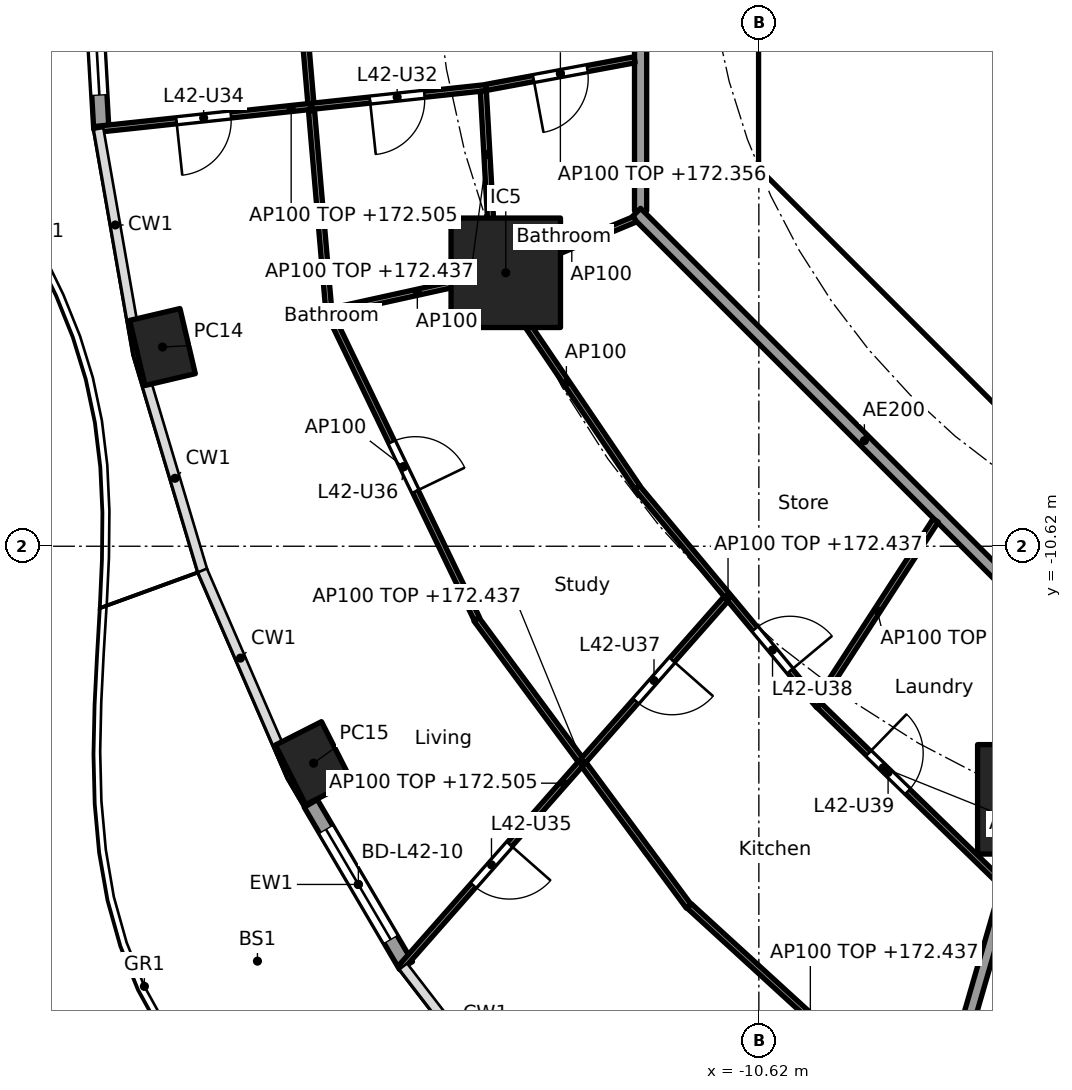
"""IFC4 building model, lengths in metres.
Left out: names, types, materials, properties, quantities, classifications, styles, units other than length and angle.
Written with IfcOpenShell. Run it as: python <this file> out.ifc"""

import sys

from ifc_helpers import new_model, si_unit, direction, frame, frame_2d, origin, origin_2d, place, context, subcontext, project, spatial, polyline, rectangle, hollow_rectangle, outline, extrude, element, fill, save


model = new_model("IFC4")
c1 = context("Model", 3, precision=1e-05, world=origin(), true_north=direction((0.0, 1.0)))
c2 = subcontext(c1, "Body", "Model", "MODEL_VIEW")
j1 = project(units=[si_unit("LENGTHUNIT", "METRE"), si_unit("PLANEANGLEUNIT", "RADIAN")], contexts=[c1])
p1 = place(None, origin())
s1 = spatial("IfcSite", under=j1, at=p1, CompositionType="ELEMENT")
p2 = place(p1, origin())
s2 = spatial("IfcBuilding", under=s1, at=p2, CompositionType="ELEMENT")
p3 = place(p2, frame((0.0, 0.0, 169.6)))
s3 = spatial("IfcBuildingStorey", under=s2, at=p3, CompositionType="ELEMENT", Elevation=169.6)
for number, where, z_axis, x_axis in (
    (1, (-20.427, -7.344, 0.0), (0.0, 0.0, 1.0), (0.229, -0.973, 0.0)),
    (2, (-17.942, -14.188, 0.0), (0.0, 0.0, 1.0), (0.452, -0.892, 0.0)),
):
    element("IfcColumn", number, at=place(p3, frame(where, z_axis=z_axis, x_axis=x_axis)), inside=s3, PredefinedType="COLUMN", context=c2, shape_type="SweptSolid", body=[
        extrude(hollow_rectangle(XDim=1.1, YDim=0.85, WallThickness=0.036, at=origin_2d()), origin(), (0.0, 0.0, 1.0), 3.7),
    ])
for number, where, z_axis, x_axis in (
    (3, (-14.782, -6.123, 0.0), (0.0, 0.0, 1.0), (1.0, 0.0, 0.0)),
    (4, (-6.123, -14.782, 0.0), (0.0, 0.0, 1.0), (1.0, 0.0, 0.0)),
):
    element("IfcColumn", number, at=place(p3, frame(where, z_axis=z_axis, x_axis=x_axis)), inside=s3, PredefinedType="COLUMN", context=c2, shape_type="SweptSolid", body=[
        extrude(rectangle(XDim=1.8, YDim=1.8, at=origin_2d()), origin(), (0.0, 0.0, 1.0), 3.7),
    ])
p4 = place(p3, frame((-21.433, -3.762, 0.0), z_axis=(0.0, 0.0, 1.0), x_axis=(-0.057532692854, 0.998343622834, 0.0)))
e5 = element("IfcWall", 5, at=p4, inside=s3, PredefinedType="SOLIDWALL", context=c2, shape_type="SweptSolid", body=[
    extrude(rectangle(XDim=3.225, YDim=0.25, at=frame_2d((1.613, 0.0))), origin(), (0.0, 0.0, 1.0), 3.44),
])
p5 = place(p4, frame((0.562, 0.0, 0.0)))
e6 = element("IfcOpeningElement", 6, at=p5, cuts=e5, PredefinedType="OPENING", context=c2, shape_type="SweptSolid", body=[
    extrude(rectangle(XDim=2.1, YDim=2.4, at=frame_2d((1.05, 1.2))), frame((0.0, 0.135, 0.0), z_axis=(0.0, -1.0, 0.0), x_axis=(1.0, 0.0, 0.0)), (0.0, 0.0, 1.0), 0.27),
])
p6 = place(p3, frame((-16.424, -17.515, 0.0), z_axis=(0.0, 0.0, 1.0), x_axis=(-0.506309086483, 0.862352079458, 0.0)))
e7 = element("IfcWall", 7, at=p6, inside=s3, PredefinedType="SOLIDWALL", context=c2, shape_type="SweptSolid", body=[
    extrude(rectangle(XDim=3.092, YDim=0.25, at=frame_2d((1.546, 0.0))), origin(), (0.0, 0.0, 1.0), 3.44),
])
p7 = place(p6, frame((0.496, 0.0, 0.0)))
e8 = element("IfcOpeningElement", 8, at=p7, cuts=e7, PredefinedType="OPENING", context=c2, shape_type="SweptSolid", body=[
    extrude(rectangle(XDim=2.1, YDim=2.4, at=frame_2d((1.05, 1.2))), frame((0.0, 0.135, 0.0), z_axis=(0.0, -1.0, 0.0), x_axis=(1.0, 0.0, 0.0)), (0.0, 0.0, 1.0), 0.27),
])
p8 = place(p3, frame((-10.325, 3.801, 0.0), z_axis=(0.0, 0.0, 1.0), x_axis=(0.0, -1.0, 0.0)))
e9 = element("IfcWall", 9, at=p8, inside=s3, PredefinedType="SHEAR", context=c2, shape_type="SweptSolid", body=[
    extrude(rectangle(XDim=7.602, YDim=0.6, at=frame_2d((3.801, 0.0))), origin(), (0.0, 0.0, 1.0), 3.44),
])
p9 = place(p8, frame((0.651, 0.0, 0.0)))
e10 = element("IfcOpeningElement", 10, at=p9, cuts=e9, PredefinedType="OPENING", context=c2, shape_type="SweptSolid", body=[
    extrude(rectangle(XDim=1.5, YDim=2.1, at=frame_2d((0.75, 1.05))), frame((0.0, 0.31, 0.0), z_axis=(0.0, -1.0, 0.0), x_axis=(1.0, 0.0, 0.0)), (0.0, 0.0, 1.0), 0.62),
])
p10 = place(p8, frame((5.451, 0.0, 0.0)))
e11 = element("IfcOpeningElement", 11, at=p10, cuts=e9, PredefinedType="OPENING", context=c2, shape_type="SweptSolid", body=[
    extrude(rectangle(XDim=1.5, YDim=2.1, at=frame_2d((0.75, 1.05))), frame((0.0, 0.31, 0.0), z_axis=(0.0, -1.0, 0.0), x_axis=(1.0, 0.0, 0.0)), (0.0, 0.0, 1.0), 0.62),
])
p11 = place(p3, frame((-9.988, -4.613, 0.0), z_axis=(0.0, 0.0, 1.0), x_axis=(0.707106781187, -0.707106781187, 0.0)))
e12 = element("IfcWall", 12, at=p11, inside=s3, PredefinedType="SHEAR", context=c2, shape_type="SweptSolid", body=[
    extrude(rectangle(XDim=7.602, YDim=0.6, at=frame_2d((3.801, 0.0))), origin(), (0.0, 0.0, 1.0), 3.44),
])
p12 = place(p11, frame((6.151, 0.0, 0.0)))
e13 = element("IfcOpeningElement", 13, at=p12, cuts=e12, PredefinedType="OPENING", context=c2, shape_type="SweptSolid", body=[
    extrude(rectangle(XDim=1.1, YDim=2.1, at=frame_2d((0.55, 1.05))), frame((0.0, 0.31, 0.0), z_axis=(0.0, -1.0, 0.0), x_axis=(1.0, 0.0, 0.0)), (0.0, 0.0, 1.0), 0.62),
])
p13 = place(p3, origin())
e14 = element("IfcWall", 14, at=p13, inside=s3, PredefinedType="SHEAR", context=c2, shape_type="SweptSolid", body=[
    extrude(outline(polyline([(-10.625, -3.801), (-10.025, -3.801), (-10.025, -4.152), (-9.776, -4.401), (-10.2, -4.825), (-10.625, -4.401), (-10.625, -3.801)])), origin(), (0.0, 0.0, 1.0), 3.44),
])
p14 = place(p3, frame((-10.025, -4.0, 0.0), z_axis=(0.0, 0.0, 1.0), x_axis=(1.0, 0.0, 0.0)))
e15 = element("IfcWall", 15, at=p14, inside=s3, PredefinedType="PARTITIONING", context=c2, shape_type="SweptSolid", body=[
    extrude(rectangle(XDim=3.325, YDim=0.2, at=frame_2d((1.662, 0.0))), origin(), (0.0, 0.0, 1.0), 3.44),
])
p15 = place(p3, frame((-8.301, -5.8, 0.0), z_axis=(0.0, 0.0, 1.0), x_axis=(1.0, 0.0, 0.0)))
e16 = element("IfcWall", 16, at=p15, inside=s3, PredefinedType="PARTITIONING", context=c2, shape_type="SweptSolid", body=[
    extrude(rectangle(XDim=2.426, YDim=0.15, at=frame_2d((1.213, 0.0))), origin(), (0.0, 0.0, 1.0), 3.44),
])
p16 = place(p3, frame((-6.137, -14.83, 0.0), z_axis=(0.0, 0.0, 1.0), x_axis=(-0.278461169897, -0.96044748782, 0.0)))
e17 = element("IfcWall", 17, at=p16, inside=s3, PredefinedType="PARTITIONING", context=c2, shape_type="SweptSolid", body=[
    extrude(rectangle(XDim=9.573, YDim=0.2, at=frame_2d((4.787, 0.0))), origin(), (0.0, 0.0, 1.0), 2.837),
])
p17 = place(p3, frame((-12.565, 5.304, 0.0), z_axis=(0.0, 0.0, 1.0), x_axis=(0.0, -1.0, 0.0)))
e18 = element("IfcWall", 18, at=p17, inside=s3, PredefinedType="PARTITIONING", context=c2, shape_type="SweptSolid", body=[
    extrude(rectangle(XDim=10.409, YDim=0.2, at=frame_2d((5.205, 0.0))), origin(), (0.0, 0.0, 1.0), 3.44),
])
p18 = place(p17, frame((6.106, 0.0, 0.0)))
e19 = element("IfcOpeningElement", 19, at=p18, cuts=e18, PredefinedType="OPENING", context=c2, shape_type="SweptSolid", body=[
    extrude(rectangle(XDim=1.0, YDim=2.1, at=frame_2d((0.5, 1.05))), frame((0.0, 0.11, 0.0), z_axis=(0.0, -1.0, 0.0), x_axis=(1.0, 0.0, 0.0)), (0.0, 0.0, 1.0), 0.22),
])
p19 = place(p3, frame((-12.635, -5.134, 0.0), z_axis=(0.0, 0.0, 1.0), x_axis=(0.707106781187, -0.707106781187, 0.0)))
e20 = element("IfcWall", 20, at=p19, inside=s3, PredefinedType="PARTITIONING", context=c2, shape_type="SweptSolid", body=[
    extrude(rectangle(XDim=10.609, YDim=0.2, at=frame_2d((5.305, 0.0))), origin(), (0.0, 0.0, 1.0), 3.44),
])
p20 = place(p3, frame((-18.271, -0.05, 0.0), z_axis=(0.0, 0.0, 1.0), x_axis=(0.086018199227, -0.996293565874, 0.0)))
e21 = element("IfcWall", 21, at=p20, inside=s3, PredefinedType="PARTITIONING", context=c2, shape_type="SweptSolid", body=[
    extrude(rectangle(XDim=6.789, YDim=0.1, at=frame_2d((3.395, 0.0))), origin(), (0.0, 0.0, 1.0), 2.837),
])
p21 = place(p3, frame((-12.663, -2.621, 0.0), z_axis=(0.0, 0.0, 1.0), x_axis=(-0.983176884312, -0.182655999505, 0.0)))
e22 = element("IfcWall", 22, at=p21, inside=s3, PredefinedType="PARTITIONING", context=c2, shape_type="SweptSolid", body=[
    extrude(rectangle(XDim=2.483, YDim=0.1, at=frame_2d((1.242, 0.0))), origin(), (0.0, 0.0, 1.0), 2.756),
])
p22 = place(p21, frame((0.792, 0.0, 0.0)))
e23 = element("IfcOpeningElement", 23, at=p22, cuts=e22, PredefinedType="OPENING", context=c2, shape_type="SweptSolid", body=[
    extrude(rectangle(XDim=0.9, YDim=2.1, at=frame_2d((0.45, 1.05))), frame((0.0, 0.06, 0.0), z_axis=(0.0, -1.0, 0.0), x_axis=(1.0, 0.0, 0.0)), (0.0, 0.0, 1.0), 0.12),
])
p23 = place(p3, frame((-15.104, -3.078, 0.0), z_axis=(0.0, 0.0, 1.0), x_axis=(-0.994316167803, -0.106467640365, 0.0)))
e24 = element("IfcWall", 24, at=p23, inside=s3, PredefinedType="PARTITIONING", context=c2, shape_type="SweptSolid", body=[
    extrude(rectangle(XDim=6.45, YDim=0.1, at=frame_2d((3.225, 0.0))), origin(), (0.0, 0.0, 1.0), 2.905),
])
p24 = place(p23, frame((1.022, 0.0, 0.0)))
e25 = element("IfcOpeningElement", 25, at=p24, cuts=e24, PredefinedType="OPENING", context=c2, shape_type="SweptSolid", body=[
    extrude(rectangle(XDim=0.9, YDim=2.1, at=frame_2d((0.45, 1.05))), frame((0.0, 0.06, 0.0), z_axis=(0.0, -1.0, 0.0), x_axis=(1.0, 0.0, 0.0)), (0.0, 0.0, 1.0), 0.12),
])
p25 = place(p23, frame((4.223, 0.0, 0.0)))
e26 = element("IfcOpeningElement", 26, at=p25, cuts=e24, PredefinedType="OPENING", context=c2, shape_type="SweptSolid", body=[
    extrude(rectangle(XDim=0.9, YDim=2.1, at=frame_2d((0.45, 1.05))), frame((0.0, 0.06, 0.0), z_axis=(0.0, -1.0, 0.0), x_axis=(1.0, 0.0, 0.0)), (0.0, 0.0, 1.0), 0.12),
])
p26 = place(p3, frame((-15.151, -3.133, 0.0), z_axis=(0.0, 0.0, 1.0), x_axis=(0.05637501378, -0.998409664327, 0.0)))
e27 = element("IfcWall", 27, at=p26, inside=s3, PredefinedType="PARTITIONING", context=c2, shape_type="SweptSolid", body=[
    extrude(rectangle(XDim=2.988, YDim=0.1, at=frame_2d((1.494, 0.0))), origin(), (0.0, 0.0, 1.0), 2.837),
])
p27 = place(p3, frame((-12.657, -5.243, 0.0), z_axis=(0.0, 0.0, 1.0), x_axis=(-0.923848837015, -0.382757529444, 0.0)))
e28 = element("IfcWall", 28, at=p27, inside=s3, PredefinedType="PARTITIONING", context=c2, shape_type="SweptSolid", body=[
    extrude(rectangle(XDim=2.25, YDim=0.1, at=frame_2d((1.125, 0.0))), origin(), (0.0, 0.0, 1.0), 3.44),
])
p28 = place(p3, frame((-14.831, -6.134, 0.0), z_axis=(0.0, 0.0, 1.0), x_axis=(-0.976560749847, -0.215241961191, 0.0)))
e29 = element("IfcWall", 29, at=p28, inside=s3, PredefinedType="PARTITIONING", context=c2, shape_type="SweptSolid", body=[
    extrude(rectangle(XDim=2.879, YDim=0.1, at=frame_2d((1.439, 0.0))), origin(), (0.0, 0.0, 1.0), 3.44),
])
p29 = place(p3, frame((-14.952, -6.208, 0.0), z_axis=(0.0, 0.0, 1.0), x_axis=(0.561064907171, -0.827771810308, 0.0)))
e30 = element("IfcWall", 30, at=p29, inside=s3, PredefinedType="PARTITIONING", context=c2, shape_type="SweptSolid", body=[
    extrude(rectangle(XDim=4.159, YDim=0.1, at=frame_2d((2.079, 0.0))), origin(), (0.0, 0.0, 1.0), 3.44),
])
p30 = place(p3, frame((-17.669, -6.809, 0.0), z_axis=(0.0, 0.0, 1.0), x_axis=(0.434040130629, -0.900893536997, 0.0)))
e31 = element("IfcWall", 31, at=p30, inside=s3, PredefinedType="PARTITIONING", context=c2, shape_type="SweptSolid", body=[
    extrude(rectangle(XDim=5.558, YDim=0.1, at=frame_2d((2.779, 0.0))), origin(), (0.0, 0.0, 1.0), 3.44),
])
p31 = place(p30, frame((2.329, 0.0, 0.0)))
e32 = element("IfcOpeningElement", 32, at=p31, cuts=e31, PredefinedType="OPENING", context=c2, shape_type="SweptSolid", body=[
    extrude(rectangle(XDim=0.9, YDim=2.1, at=frame_2d((0.45, 1.05))), frame((0.0, 0.06, 0.0), z_axis=(0.0, -1.0, 0.0), x_axis=(1.0, 0.0, 0.0)), (0.0, 0.0, 1.0), 0.12),
])
p32 = place(p3, frame((-12.623, -9.653, 0.0), z_axis=(0.0, 0.0, 1.0), x_axis=(0.640297481347, -0.768127030758, 0.0)))
e33 = element("IfcWall", 33, at=p32, inside=s3, PredefinedType="PARTITIONING", context=c2, shape_type="SweptSolid", body=[
    extrude(rectangle(XDim=4.672, YDim=0.1, at=frame_2d((2.336, 0.0))), origin(), (0.0, 0.0, 1.0), 2.837),
])
p33 = place(p32, frame((3.029, 0.0, 0.0)))
e34 = element("IfcOpeningElement", 34, at=p33, cuts=e33, PredefinedType="OPENING", context=c2, shape_type="SweptSolid", body=[
    extrude(rectangle(XDim=0.9, YDim=2.1, at=frame_2d((0.45, 1.05))), frame((0.0, 0.06, 0.0), z_axis=(0.0, -1.0, 0.0), x_axis=(1.0, 0.0, 0.0)), (0.0, 0.0, 1.0), 0.12),
])
p34 = place(p3, frame((-15.265, -11.821, 0.0), z_axis=(0.0, 0.0, 1.0), x_axis=(0.594711348772, -0.803939308432, 0.0)))
e35 = element("IfcWall", 35, at=p34, inside=s3, PredefinedType="PARTITIONING", context=c2, shape_type="SweptSolid", body=[
    extrude(rectangle(XDim=5.872, YDim=0.1, at=frame_2d((2.936, 0.0))), origin(), (0.0, 0.0, 1.0), 2.837),
])
p35 = place(p3, frame((-11.16, -11.485, 0.0), z_axis=(0.0, 0.0, 1.0), x_axis=(-0.661275898802, -0.750142776852, 0.0)))
e36 = element("IfcWall", 36, at=p35, inside=s3, PredefinedType="PARTITIONING", context=c2, shape_type="SweptSolid", body=[
    extrude(rectangle(XDim=8.083, YDim=0.1, at=frame_2d((4.041, 0.0))), origin(), (0.0, 0.0, 1.0), 2.905),
])
p36 = place(p35, frame((5.382, 0.0, 0.0)))
e37 = element("IfcOpeningElement", 37, at=p36, cuts=e36, PredefinedType="OPENING", context=c2, shape_type="SweptSolid", body=[
    extrude(rectangle(XDim=0.9, YDim=2.1, at=frame_2d((0.45, 1.05))), frame((0.0, 0.06, 0.0), z_axis=(0.0, -1.0, 0.0), x_axis=(1.0, 0.0, 0.0)), (0.0, 0.0, 1.0), 0.12),
])
p37 = place(p35, frame((1.341, 0.0, 0.0)))
e38 = element("IfcOpeningElement", 38, at=p37, cuts=e36, PredefinedType="OPENING", context=c2, shape_type="SweptSolid", body=[
    extrude(rectangle(XDim=0.9, YDim=2.1, at=frame_2d((0.45, 1.05))), frame((0.0, 0.06, 0.0), z_axis=(0.0, -1.0, 0.0), x_axis=(1.0, 0.0, 0.0)), (0.0, 0.0, 1.0), 0.12),
])
p38 = place(p3, frame((-7.712, -10.195, 0.0), z_axis=(0.0, 0.0, 1.0), x_axis=(-0.544170086001, -0.838974920663, 0.0)))
e39 = element("IfcWall", 39, at=p38, inside=s3, PredefinedType="PARTITIONING", context=c2, shape_type="SweptSolid", body=[
    extrude(rectangle(XDim=3.535, YDim=0.1, at=frame_2d((1.768, 0.0))), origin(), (0.0, 0.0, 1.0), 2.756),
])
p39 = place(p3, frame((-9.627, -13.238, 0.0), z_axis=(0.0, 0.0, 1.0), x_axis=(0.716919058692, -0.697156412352, 0.0)))
e40 = element("IfcWall", 40, at=p39, inside=s3, PredefinedType="PARTITIONING", context=c2, shape_type="SweptSolid", body=[
    extrude(rectangle(XDim=4.2, YDim=0.1, at=frame_2d((2.1, 0.0))), origin(), (0.0, 0.0, 1.0), 2.837),
])
p40 = place(p39, frame((1.13, 0.0, 0.0)))
e41 = element("IfcOpeningElement", 41, at=p40, cuts=e40, PredefinedType="OPENING", context=c2, shape_type="SweptSolid", body=[
    extrude(rectangle(XDim=0.9, YDim=2.1, at=frame_2d((0.45, 1.05))), frame((0.0, 0.06, 0.0), z_axis=(0.0, -1.0, 0.0), x_axis=(1.0, 0.0, 0.0)), (0.0, 0.0, 1.0), 0.12),
])
p41 = place(p3, frame((-11.766, -16.535, 0.0), z_axis=(0.0, 0.0, 1.0), x_axis=(0.73807320557, -0.674720640872, 0.0)))
e42 = element("IfcWall", 42, at=p41, inside=s3, PredefinedType="PARTITIONING", context=c2, shape_type="SweptSolid", body=[
    extrude(rectangle(XDim=5.399, YDim=0.1, at=frame_2d((2.699, 0.0))), origin(), (0.0, 0.0, 1.0), 2.837),
])
p42 = place(p5, origin())
e43 = element("IfcDoor", 43, at=p42, inside=s3, OperationType="SLIDING_TO_LEFT", PredefinedType="DOOR", context=c2, shape_type="SweptSolid", body=[
    extrude(rectangle(XDim=2.1, YDim=2.4, at=frame_2d((1.05, 1.2))), frame((0.0, 0.025, 0.0), z_axis=(0.0, -1.0, 0.0), x_axis=(1.0, 0.0, 0.0)), (0.0, 0.0, 1.0), 0.05),
])
fill(e6, e43)
p43 = place(p7, origin())
e44 = element("IfcDoor", 44, at=p43, inside=s3, OperationType="SLIDING_TO_LEFT", PredefinedType="DOOR", context=c2, shape_type="SweptSolid", body=[
    extrude(rectangle(XDim=2.1, YDim=2.4, at=frame_2d((1.05, 1.2))), frame((0.0, 0.025, 0.0), z_axis=(0.0, -1.0, 0.0), x_axis=(1.0, 0.0, 0.0)), (0.0, 0.0, 1.0), 0.05),
])
fill(e8, e44)
p44 = place(p10, origin())
e45 = element("IfcDoor", 45, at=p44, inside=s3, OperationType="DOUBLE_DOOR_SINGLE_SWING", PredefinedType="DOOR", context=c2, shape_type="SweptSolid", body=[
    extrude(rectangle(XDim=1.5, YDim=2.1, at=frame_2d((0.75, 1.05))), frame((0.0, 0.025, 0.0), z_axis=(0.0, -1.0, 0.0), x_axis=(1.0, 0.0, 0.0)), (0.0, 0.0, 1.0), 0.05),
])
fill(e11, e45)
p45 = place(p22, origin())
e46 = element("IfcDoor", 46, at=p45, inside=s3, OperationType="SINGLE_SWING_RIGHT", PredefinedType="DOOR", context=c2, shape_type="SweptSolid", body=[
    extrude(rectangle(XDim=0.9, YDim=2.1, at=frame_2d((0.45, 1.05))), frame((0.0, 0.025, 0.0), z_axis=(0.0, -1.0, 0.0), x_axis=(1.0, 0.0, 0.0)), (0.0, 0.0, 1.0), 0.05),
])
fill(e23, e46)
p46 = place(p24, origin())
e47 = element("IfcDoor", 47, at=p46, inside=s3, OperationType="SINGLE_SWING_RIGHT", PredefinedType="DOOR", context=c2, shape_type="SweptSolid", body=[
    extrude(rectangle(XDim=0.9, YDim=2.1, at=frame_2d((0.45, 1.05))), frame((0.0, 0.025, 0.0), z_axis=(0.0, -1.0, 0.0), x_axis=(1.0, 0.0, 0.0)), (0.0, 0.0, 1.0), 0.05),
])
fill(e25, e47)
p47 = place(p25, origin())
e48 = element("IfcDoor", 48, at=p47, inside=s3, OperationType="SINGLE_SWING_RIGHT", PredefinedType="DOOR", context=c2, shape_type="SweptSolid", body=[
    extrude(rectangle(XDim=0.9, YDim=2.1, at=frame_2d((0.45, 1.05))), frame((0.0, 0.025, 0.0), z_axis=(0.0, -1.0, 0.0), x_axis=(1.0, 0.0, 0.0)), (0.0, 0.0, 1.0), 0.05),
])
fill(e26, e48)
p48 = place(p36, origin())
e49 = element("IfcDoor", 49, at=p48, inside=s3, OperationType="SINGLE_SWING_LEFT", PredefinedType="DOOR", context=c2, shape_type="SweptSolid", body=[
    extrude(rectangle(XDim=0.9, YDim=2.1, at=frame_2d((0.45, 1.05))), frame((0.0, 0.025, 0.0), z_axis=(0.0, -1.0, 0.0), x_axis=(1.0, 0.0, 0.0)), (0.0, 0.0, 1.0), 0.05),
])
fill(e37, e49)
p49 = place(p31, origin())
e50 = element("IfcDoor", 50, at=p49, inside=s3, OperationType="SINGLE_SWING_RIGHT", PredefinedType="DOOR", context=c2, shape_type="SweptSolid", body=[
    extrude(rectangle(XDim=0.9, YDim=2.1, at=frame_2d((0.45, 1.05))), frame((0.0, 0.025, 0.0), z_axis=(0.0, -1.0, 0.0), x_axis=(1.0, 0.0, 0.0)), (0.0, 0.0, 1.0), 0.05),
])
fill(e32, e50)
p50 = place(p37, origin())
e51 = element("IfcDoor", 51, at=p50, inside=s3, OperationType="SINGLE_SWING_LEFT", PredefinedType="DOOR", context=c2, shape_type="SweptSolid", body=[
    extrude(rectangle(XDim=0.9, YDim=2.1, at=frame_2d((0.45, 1.05))), frame((0.0, 0.025, 0.0), z_axis=(0.0, -1.0, 0.0), x_axis=(1.0, 0.0, 0.0)), (0.0, 0.0, 1.0), 0.05),
])
fill(e38, e51)
p51 = place(p33, origin())
e52 = element("IfcDoor", 52, at=p51, inside=s3, OperationType="SINGLE_SWING_RIGHT", PredefinedType="DOOR", context=c2, shape_type="SweptSolid", body=[
    extrude(rectangle(XDim=0.9, YDim=2.1, at=frame_2d((0.45, 1.05))), frame((0.0, 0.025, 0.0), z_axis=(0.0, -1.0, 0.0), x_axis=(1.0, 0.0, 0.0)), (0.0, 0.0, 1.0), 0.05),
])
fill(e34, e52)
p52 = place(p40, origin())
e53 = element("IfcDoor", 53, at=p52, inside=s3, OperationType="SINGLE_SWING_LEFT", PredefinedType="DOOR", context=c2, shape_type="SweptSolid", body=[
    extrude(rectangle(XDim=0.9, YDim=2.1, at=frame_2d((0.45, 1.05))), frame((0.0, 0.025, 0.0), z_axis=(0.0, -1.0, 0.0), x_axis=(1.0, 0.0, 0.0)), (0.0, 0.0, 1.0), 0.05),
])
fill(e41, e53)
save(model, sys.argv[1])
